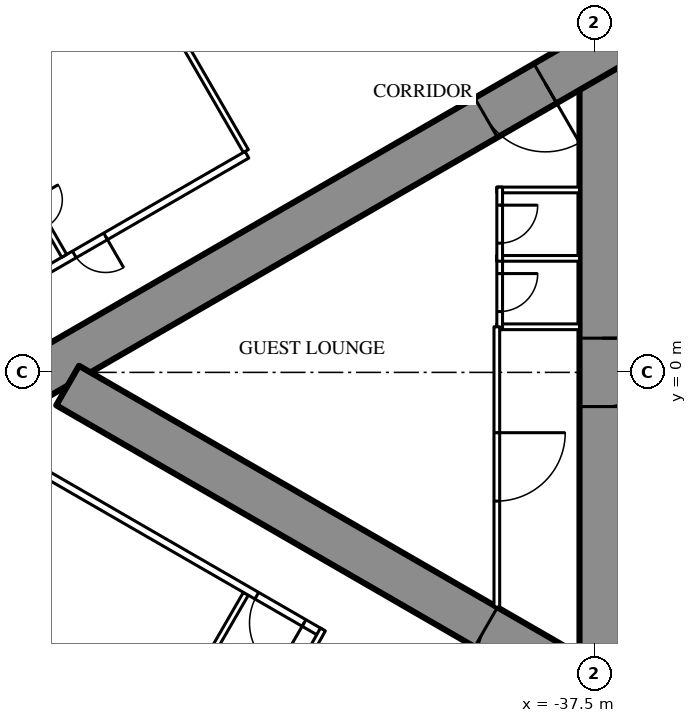
"""IFC4 building model, lengths in metres.
Left out: names, types, materials, properties, quantities, classifications, styles, units other than length and angle.
Written with IfcOpenShell. Run it as: python <this file> out.ifc"""

import sys

from ifc_helpers import new_model, si_unit, direction, frame, frame_2d, origin, place, context, subcontext, project, spatial, rectangle, extrude, element, fill, save


model = new_model("IFC4")
c1 = context("Model", 3, precision=1e-05, world=origin(), true_north=direction((0.0, 1.0)))
c2 = subcontext(c1, "Body", "Model", "MODEL_VIEW")
j1 = project(units=[si_unit("LENGTHUNIT", "METRE"), si_unit("PLANEANGLEUNIT", "RADIAN")], contexts=[c1])
p1 = place(None, origin())
s1 = spatial("IfcSite", under=j1, at=p1, CompositionType="ELEMENT")
p2 = place(p1, origin())
s2 = spatial("IfcBuilding", under=s1, at=p2, CompositionType="ELEMENT")
p3 = place(p2, frame((0.0, 0.0, 159.8)))
s3 = spatial("IfcBuildingStorey", under=s2, at=p3, CompositionType="ELEMENT", Elevation=159.8)
p4 = place(p3, frame((-37.3, 8.6, 0.0), z_axis=(0.0, 0.0, 1.0), x_axis=(0.0, -1.0, 0.0)))
e1 = element("IfcWall", 1, at=p4, inside=s3, PredefinedType="SHEAR", context=c2, shape_type="SweptSolid", body=[
    extrude(rectangle(XDim=17.2, YDim=1.2, at=frame_2d((8.6, 0.0))), origin(), (0.0, 0.0, 1.0), 3.5),
])
p5 = place(p4, frame((7.7, 0.0, 0.0)))
e2 = element("IfcOpeningElement", 2, at=p5, cuts=e1, PredefinedType="OPENING", context=c2, shape_type="SweptSolid", body=[
    extrude(rectangle(XDim=1.8, YDim=2.2, at=frame_2d((0.9, 1.1))), frame((0.0, 0.61, 0.0), z_axis=(0.0, -1.0, 0.0), x_axis=(1.0, 0.0, 0.0)), (0.0, 0.0, 1.0), 1.22),
])
p6 = place(p3, frame((-27.2, 14.3, 0.0), z_axis=(0.0, 0.0, 1.0), x_axis=(-0.866026593062, -0.499997940104, 0.0)))
e3 = element("IfcWall", 3, at=p6, inside=s3, PredefinedType="SHEAR", context=c2, shape_type="SweptSolid", body=[
    extrude(rectangle(XDim=28.946, YDim=1.2, at=frame_2d((14.473, 0.0))), origin(), (0.0, 0.0, 1.0), 3.5),
])
p7 = place(p6, frame((4.6, 0.0, 0.0)))
e4 = element("IfcOpeningElement", 4, at=p7, cuts=e3, PredefinedType="OPENING", context=c2, shape_type="SweptSolid", body=[
    extrude(rectangle(XDim=1.0, YDim=2.2, at=frame_2d((0.5, 1.1))), frame((0.0, 0.61, 0.0), z_axis=(0.0, -1.0, 0.0), x_axis=(1.0, 0.0, 0.0)), (0.0, 0.0, 1.0), 1.22),
])
p8 = place(p6, frame((13.395, 0.0, 0.0)))
e5 = element("IfcOpeningElement", 5, at=p8, cuts=e3, PredefinedType="OPENING", context=c2, shape_type="SweptSolid", body=[
    extrude(rectangle(XDim=1.8, YDim=2.2, at=frame_2d((0.9, 1.1))), frame((0.0, 0.61, 0.0), z_axis=(0.0, -1.0, 0.0), x_axis=(1.0, 0.0, 0.0)), (0.0, 0.0, 1.0), 1.22),
])
p9 = place(p3, frame((-27.2, -14.3, 0.0), z_axis=(0.0, 0.0, 1.0), x_axis=(-0.866024021859, 0.500002393557, 0.0)))
e6 = element("IfcWall", 6, at=p9, inside=s3, PredefinedType="SHEAR", context=c2, shape_type="SweptSolid", body=[
    extrude(rectangle(XDim=27.907, YDim=1.2, at=frame_2d((13.954, 0.0))), origin(), (0.0, 0.0, 1.0), 3.5),
])
p10 = place(p9, frame((4.6, 0.0, 0.0)))
e7 = element("IfcOpeningElement", 7, at=p10, cuts=e6, PredefinedType="OPENING", context=c2, shape_type="SweptSolid", body=[
    extrude(rectangle(XDim=1.0, YDim=2.2, at=frame_2d((0.5, 1.1))), frame((0.0, 0.61, 0.0), z_axis=(0.0, -1.0, 0.0), x_axis=(1.0, 0.0, 0.0)), (0.0, 0.0, 1.0), 1.22),
])
p11 = place(p9, frame((13.395, 0.0, 0.0)))
e8 = element("IfcOpeningElement", 8, at=p11, cuts=e6, PredefinedType="OPENING", context=c2, shape_type="SweptSolid", body=[
    extrude(rectangle(XDim=1.8, YDim=2.2, at=frame_2d((0.9, 1.1))), frame((0.0, 0.61, 0.0), z_axis=(0.0, -1.0, 0.0), x_axis=(1.0, 0.0, 0.0)), (0.0, 0.0, 1.0), 1.22),
])
for number, where, z_axis, x_axis in (
    (9, (-46.679, 5.825, 0.0), (0.0, 0.0, 1.0), (-0.5, 0.866, 0.0)),
    (10, (-46.679, -5.825, 0.0), (0.0, 0.0, 1.0), (-0.5, -0.866, 0.0)),
):
    element("IfcWall", number, at=place(p3, frame(where, z_axis=z_axis, x_axis=x_axis)), inside=s3, PredefinedType="PARTITIONING", context=c2, shape_type="SweptSolid", body=[
        extrude(rectangle(XDim=6.911, YDim=0.15, at=frame_2d((3.456, 0.0))), origin(), (0.0, 0.0, 1.0), 2.3),
    ])
p12 = place(p3, frame((-44.715, -6.844, 0.0), z_axis=(0.0, 0.0, 1.0), x_axis=(-0.866025261224, 0.500000246922, 0.0)))
e11 = element("IfcWall", 11, at=p12, inside=s3, PredefinedType="PARTITIONING", context=c2, shape_type="SweptSolid", body=[
    extrude(rectangle(XDim=13.567, YDim=0.2, at=frame_2d((6.783, 0.0))), origin(), (0.0, 0.0, 1.0), 3.25),
])
p13 = place(p12, frame((10.579, 0.0, 0.0)))
e12 = element("IfcOpeningElement", 12, at=p13, cuts=e11, PredefinedType="OPENING", context=c2, shape_type="SweptSolid", body=[
    extrude(rectangle(XDim=0.95, YDim=2.2, at=frame_2d((0.475, 1.1))), frame((0.0, 0.11, 0.0), z_axis=(0.0, -1.0, 0.0), x_axis=(1.0, 0.0, 0.0)), (0.0, 0.0, 1.0), 0.22),
])
p14 = place(p12, frame((8.879, 0.0, 0.0)))
e13 = element("IfcOpeningElement", 13, at=p14, cuts=e11, PredefinedType="OPENING", context=c2, shape_type="SweptSolid", body=[
    extrude(rectangle(XDim=0.95, YDim=2.2, at=frame_2d((0.475, 1.1))), frame((0.0, 0.11, 0.0), z_axis=(0.0, -1.0, 0.0), x_axis=(1.0, 0.0, 0.0)), (0.0, 0.0, 1.0), 0.22),
])
p15 = place(p12, frame((0.5, 0.0, 0.0)))
e14 = element("IfcOpeningElement", 14, at=p15, cuts=e11, PredefinedType="OPENING", context=c2, shape_type="SweptSolid", body=[
    extrude(rectangle(XDim=1.435, YDim=2.2, at=frame_2d((0.718, 1.1))), frame((0.0, 0.11, 0.0), z_axis=(0.0, -1.0, 0.0), x_axis=(1.0, 0.0, 0.0)), (0.0, 0.0, 1.0), 0.22),
])
p16 = place(p3, frame((-44.652, -6.764, 0.0), z_axis=(0.0, 0.0, 1.0), x_axis=(-0.485424724123, -0.874278466629, 0.0)))
e15 = element("IfcWall", 15, at=p16, inside=s3, PredefinedType="PARTITIONING", context=c2, shape_type="SweptSolid", body=[
    extrude(rectangle(XDim=1.805, YDim=0.15, at=frame_2d((0.903, 0.0))), origin(), (0.0, 0.0, 1.0), 3.25),
])
p17 = place(p3, frame((-46.65, 5.726, 0.0), z_axis=(0.0, 0.0, 1.0), x_axis=(-0.866027963864, -0.499995565786, 0.0)))
e16 = element("IfcWall", 16, at=p17, inside=s3, PredefinedType="PARTITIONING", context=c2, shape_type="SweptSolid", body=[
    extrude(rectangle(XDim=11.452, YDim=0.2, at=frame_2d((5.726, 0.0))), origin(), (0.0, 0.0, 1.0), 3.25),
])
p18 = place(p17, frame((4.294, 0.0, 0.0)))
e17 = element("IfcOpeningElement", 17, at=p18, cuts=e16, PredefinedType="OPENING", context=c2, shape_type="SweptSolid", body=[
    extrude(rectangle(XDim=0.95, YDim=2.2, at=frame_2d((0.475, 1.1))), frame((0.0, 0.11, 0.0), z_axis=(0.0, -1.0, 0.0), x_axis=(1.0, 0.0, 0.0)), (0.0, 0.0, 1.0), 0.22),
])
p19 = place(p17, frame((8.344, 0.0, 0.0)))
e18 = element("IfcOpeningElement", 18, at=p19, cuts=e16, PredefinedType="OPENING", context=c2, shape_type="SweptSolid", body=[
    extrude(rectangle(XDim=0.95, YDim=2.2, at=frame_2d((0.475, 1.1))), frame((0.0, 0.11, 0.0), z_axis=(0.0, -1.0, 0.0), x_axis=(1.0, 0.0, 0.0)), (0.0, 0.0, 1.0), 0.22),
])
p20 = place(p3, frame((-51.459, 3.065, 0.0), z_axis=(0.0, 0.0, 1.0), x_axis=(-0.499936506574, 0.866062058628, 0.0)))
e19 = element("IfcWall", 19, at=p20, inside=s3, PredefinedType="PARTITIONING", context=c2, shape_type="SweptSolid", body=[
    extrude(rectangle(XDim=2.6, YDim=0.15, at=frame_2d((1.3, 0.0))), origin(), (0.0, 0.0, 1.0), 3.25),
])
p21 = place(p20, frame((0.9, 0.0, 0.0)))
e20 = element("IfcOpeningElement", 20, at=p21, cuts=e19, PredefinedType="OPENING", context=c2, shape_type="SweptSolid", body=[
    extrude(rectangle(XDim=0.8, YDim=2.2, at=frame_2d((0.4, 1.1))), frame((0.0, 0.085, 0.0), z_axis=(0.0, -1.0, 0.0), x_axis=(1.0, 0.0, 0.0)), (0.0, 0.0, 1.0), 0.17),
])
for number, where, z_axis, x_axis in (
    (21, (-37.9, 1.2, 0.0), (0.0, 0.0, 1.0), (-1.0, 0.0, 0.0)),
    (22, (-37.9, 3.0, 0.0), (0.0, 0.0, 1.0), (-1.0, 0.0, 0.0)),
    (23, (-37.9, 4.8, 0.0), (0.0, 0.0, 1.0), (-1.0, 0.0, 0.0)),
):
    element("IfcWall", number, at=place(p3, frame(where, z_axis=z_axis, x_axis=x_axis)), inside=s3, PredefinedType="PARTITIONING", context=c2, shape_type="SweptSolid", body=[
        extrude(rectangle(XDim=2.175, YDim=0.15, at=frame_2d((1.087, 0.0))), origin(), (0.0, 0.0, 1.0), 3.25),
    ])
p22 = place(p3, frame((-40.0, 3.075, 0.0), z_axis=(0.0, 0.0, 1.0), x_axis=(0.0, -1.0, 0.0)))
e24 = element("IfcWall", 24, at=p22, inside=s3, PredefinedType="PARTITIONING", context=c2, shape_type="SweptSolid", body=[
    extrude(rectangle(XDim=1.95, YDim=0.15, at=frame_2d((0.975, 0.0))), origin(), (0.0, 0.0, 1.0), 3.25),
])
p23 = place(p22, frame((0.475, 0.0, 0.0)))
e25 = element("IfcOpeningElement", 25, at=p23, cuts=e24, PredefinedType="OPENING", context=c2, shape_type="SweptSolid", body=[
    extrude(rectangle(XDim=1.0, YDim=2.2, at=frame_2d((0.5, 1.1))), frame((0.0, 0.085, 0.0), z_axis=(0.0, -1.0, 0.0), x_axis=(1.0, 0.0, 0.0)), (0.0, 0.0, 1.0), 0.17),
])
p24 = place(p3, frame((-40.0, 4.875, 0.0), z_axis=(0.0, 0.0, 1.0), x_axis=(0.0, -1.0, 0.0)))
e26 = element("IfcWall", 26, at=p24, inside=s3, PredefinedType="PARTITIONING", context=c2, shape_type="SweptSolid", body=[
    extrude(rectangle(XDim=1.95, YDim=0.15, at=frame_2d((0.975, 0.0))), origin(), (0.0, 0.0, 1.0), 3.25),
])
p25 = place(p24, frame((0.475, 0.0, 0.0)))
e27 = element("IfcOpeningElement", 27, at=p25, cuts=e26, PredefinedType="OPENING", context=c2, shape_type="SweptSolid", body=[
    extrude(rectangle(XDim=1.0, YDim=2.2, at=frame_2d((0.5, 1.1))), frame((0.0, 0.085, 0.0), z_axis=(0.0, -1.0, 0.0), x_axis=(1.0, 0.0, 0.0)), (0.0, 0.0, 1.0), 0.17),
])
p26 = place(p3, frame((-40.075, 1.2, 0.0), z_axis=(0.0, 0.0, 1.0), x_axis=(0.0, -1.0, 0.0)))
e28 = element("IfcWall", 28, at=p26, inside=s3, PredefinedType="PARTITIONING", context=c2, shape_type="SweptSolid", body=[
    extrude(rectangle(XDim=7.374, YDim=0.15, at=frame_2d((3.687, 0.0))), origin(), (0.0, 0.0, 1.0), 3.25),
])
p27 = place(p26, frame((2.787, 0.0, 0.0)))
e29 = element("IfcOpeningElement", 29, at=p27, cuts=e28, PredefinedType="OPENING", context=c2, shape_type="SweptSolid", body=[
    extrude(rectangle(XDim=1.8, YDim=2.2, at=frame_2d((0.9, 1.1))), frame((0.0, 0.085, 0.0), z_axis=(0.0, -1.0, 0.0), x_axis=(1.0, 0.0, 0.0)), (0.0, 0.0, 1.0), 0.17),
])
p28 = place(p18, origin())
e30 = element("IfcDoor", 30, at=p28, inside=s3, OperationType="SINGLE_SWING_LEFT", PredefinedType="DOOR", context=c2, shape_type="SweptSolid", body=[
    extrude(rectangle(XDim=0.95, YDim=2.2, at=frame_2d((0.475, 1.1))), frame((0.0, 0.025, 0.0), z_axis=(0.0, -1.0, 0.0), x_axis=(1.0, 0.0, 0.0)), (0.0, 0.0, 1.0), 0.05),
])
fill(e17, e30)
p29 = place(p15, origin())
e31 = element("IfcDoor", 31, at=p29, inside=s3, OperationType="SINGLE_SWING_LEFT", PredefinedType="DOOR", context=c2, shape_type="SweptSolid", body=[
    extrude(rectangle(XDim=1.435, YDim=2.2, at=frame_2d((0.718, 1.1))), frame((0.0, 0.025, 0.0), z_axis=(0.0, -1.0, 0.0), x_axis=(1.0, 0.0, 0.0)), (0.0, 0.0, 1.0), 0.05),
])
fill(e14, e31)
p30 = place(p23, origin())
e32 = element("IfcDoor", 32, at=p30, inside=s3, OperationType="SINGLE_SWING_LEFT", PredefinedType="DOOR", context=c2, shape_type="SweptSolid", body=[
    extrude(rectangle(XDim=1.0, YDim=2.2, at=frame_2d((0.5, 1.1))), frame((0.0, 0.025, 0.0), z_axis=(0.0, -1.0, 0.0), x_axis=(1.0, 0.0, 0.0)), (0.0, 0.0, 1.0), 0.05),
])
fill(e25, e32)
p31 = place(p25, origin())
e33 = element("IfcDoor", 33, at=p31, inside=s3, OperationType="SINGLE_SWING_LEFT", PredefinedType="DOOR", context=c2, shape_type="SweptSolid", body=[
    extrude(rectangle(XDim=1.0, YDim=2.2, at=frame_2d((0.5, 1.1))), frame((0.0, 0.025, 0.0), z_axis=(0.0, -1.0, 0.0), x_axis=(1.0, 0.0, 0.0)), (0.0, 0.0, 1.0), 0.05),
])
fill(e27, e33)
p32 = place(p27, origin())
e34 = element("IfcDoor", 34, at=p32, inside=s3, OperationType="DOUBLE_DOOR_SINGLE_SWING", PredefinedType="DOOR", context=c2, shape_type="SweptSolid", body=[
    extrude(rectangle(XDim=1.8, YDim=2.2, at=frame_2d((0.9, 1.1))), frame((0.0, 0.025, 0.0), z_axis=(0.0, -1.0, 0.0), x_axis=(1.0, 0.0, 0.0)), (0.0, 0.0, 1.0), 0.05),
])
fill(e29, e34)
p33 = place(p8, origin())
e35 = element("IfcDoor", 35, at=p33, inside=s3, OperationType="DOUBLE_DOOR_SINGLE_SWING", PredefinedType="DOOR", context=c2, shape_type="SweptSolid", body=[
    extrude(rectangle(XDim=1.8, YDim=2.2, at=frame_2d((0.9, 1.1))), frame((0.0, 0.025, 0.0), z_axis=(0.0, -1.0, 0.0), x_axis=(1.0, 0.0, 0.0)), (0.0, 0.0, 1.0), 0.05),
])
fill(e5, e35)
p34 = place(p11, origin())
e36 = element("IfcDoor", 36, at=p34, inside=s3, OperationType="DOUBLE_DOOR_SINGLE_SWING", PredefinedType="DOOR", context=c2, shape_type="SweptSolid", body=[
    extrude(rectangle(XDim=1.8, YDim=2.2, at=frame_2d((0.9, 1.1))), frame((0.0, 0.025, 0.0), z_axis=(0.0, -1.0, 0.0), x_axis=(1.0, 0.0, 0.0)), (0.0, 0.0, 1.0), 0.05),
])
fill(e8, e36)
p35 = place(p5, origin())
e37 = element("IfcDoor", 37, at=p35, inside=s3, OperationType="DOUBLE_DOOR_SINGLE_SWING", PredefinedType="DOOR", context=c2, shape_type="SweptSolid", body=[
    extrude(rectangle(XDim=1.8, YDim=2.2, at=frame_2d((0.9, 1.1))), frame((0.0, 0.025, 0.0), z_axis=(0.0, -1.0, 0.0), x_axis=(1.0, 0.0, 0.0)), (0.0, 0.0, 1.0), 0.05),
])
fill(e2, e37)
save(model, sys.argv[1])
